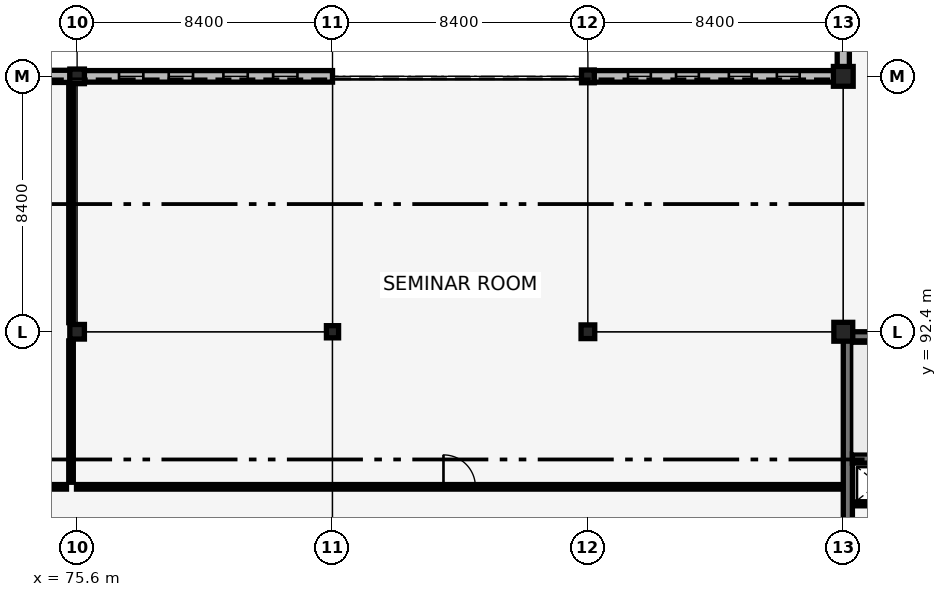
"""IFC4 building model, lengths in metres.
Left out: names, types, materials, properties, quantities, classifications, styles, units other than length and angle.
Written with IfcOpenShell. Run it as: python <this file> out.ifc"""

import sys

from ifc_helpers import new_model, si_unit, direction, frame, frame_2d, origin, origin_2d, place, context, subcontext, project, spatial, rectangle, extrude, element, fill, save


model = new_model("IFC4")
c1 = context("Model", 3, precision=1e-05, world=origin(), true_north=direction((0.0, 1.0)))
c2 = subcontext(c1, "Body", "Model", "MODEL_VIEW")
j1 = project(units=[si_unit("LENGTHUNIT", "METRE"), si_unit("PLANEANGLEUNIT", "RADIAN")], contexts=[c1])
p1 = place(None, origin())
s1 = spatial("IfcSite", under=j1, at=p1, CompositionType="ELEMENT")
p2 = place(p1, origin())
s2 = spatial("IfcBuilding", under=s1, at=p2, CompositionType="ELEMENT")
p3 = place(p2, frame((0.0, 0.0, 5.44)))
s3 = spatial("IfcBuildingStorey", under=s2, at=p3, CompositionType="ELEMENT", Elevation=5.44)
p4 = place(p3, frame((100.95, 92.25, 0.0), z_axis=(0.0, 0.0, 1.0), x_axis=(1.0, 0.0, 0.0)))
e1 = element("IfcWall", 1, at=p4, inside=s3, PredefinedType="SHEAR", context=c2, shape_type="SweptSolid", body=[
    extrude(rectangle(XDim=8.1, YDim=0.3, at=frame_2d((4.05, 0.0))), origin(), (0.0, 0.0, 1.0), 4.12),
])
p5 = place(p3, frame((100.95, 84.15, 0.0), z_axis=(0.0, 0.0, 1.0), x_axis=(0.0, 1.0, 0.0)))
e2 = element("IfcWall", 2, at=p5, inside=s3, PredefinedType="SHEAR", context=c2, shape_type="SweptSolid", body=[
    extrude(rectangle(XDim=8.1, YDim=0.3, at=frame_2d((4.05, 0.0))), origin(), (0.0, 0.0, 1.0), 4.12),
])
p6 = place(p5, frame((1.05, 0.0, 0.0)))
e3 = element("IfcOpeningElement", 3, at=p6, cuts=e2, PredefinedType="OPENING", context=c2, shape_type="SweptSolid", body=[
    extrude(rectangle(XDim=1.0, YDim=2.15, at=frame_2d((0.5, 1.075))), frame((0.0, 0.16, 0.0), z_axis=(0.0, -1.0, 0.0), x_axis=(1.0, 0.0, 0.0)), (0.0, 0.0, 1.0), 0.32),
])
p7 = place(p3, frame((101.1, 88.23, 0.0), z_axis=(0.0, 0.0, 1.0), x_axis=(1.0, 0.0, 0.0)))
e4 = element("IfcWall", 4, at=p7, inside=s3, PredefinedType="SHEAR", context=c2, shape_type="SweptSolid", body=[
    extrude(rectangle(XDim=7.8, YDim=0.3, at=frame_2d((3.9, 0.0))), origin(), (0.0, 0.0, 1.0), 4.12),
])
p8 = place(p7, frame((6.2, 0.0, 0.0)))
e5 = element("IfcOpeningElement", 5, at=p8, cuts=e4, PredefinedType="OPENING", context=c2, shape_type="SweptSolid", body=[
    extrude(rectangle(XDim=1.35, YDim=2.15, at=frame_2d((0.675, 1.075))), frame((0.0, 0.16, 0.0), z_axis=(0.0, -1.0, 0.0), x_axis=(1.0, 0.0, 0.0)), (0.0, 0.0, 1.0), 0.32),
])
for number, where, z_axis, x_axis in (
    (6, (75.6, 92.4, 0.0), (0.0, 0.0, 1.0), (1.0, 0.0, 0.0)),
    (7, (75.6, 100.8, 0.0), (0.0, 0.0, 1.0), (1.0, 0.0, 0.0)),
):
    element("IfcColumn", number, at=place(p3, frame(where, z_axis=z_axis, x_axis=x_axis)), inside=s3, PredefinedType="COLUMN", context=c2, shape_type="SweptSolid", body=[
        extrude(rectangle(XDim=0.48, YDim=0.48, at=origin_2d()), origin(), (0.0, 0.0, 1.0), 4.12),
    ])
p9 = place(p3, frame((84.0, 92.4, 0.0), z_axis=(0.0, 0.0, 1.0), x_axis=(1.0, 0.0, 0.0)))
e8 = element("IfcColumn", 8, at=p9, inside=s3, PredefinedType="COLUMN", context=c2, shape_type="SweptSolid", body=[
    extrude(rectangle(XDim=0.4, YDim=0.4, at=origin_2d()), origin(), (0.0, 0.0, 1.0), 4.12),
])
p10 = place(p3, frame((92.4, 92.4, 0.0), z_axis=(0.0, 0.0, 1.0), x_axis=(1.0, 0.0, 0.0)))
e9 = element("IfcColumn", 9, at=p10, inside=s3, PredefinedType="COLUMN", context=c2, shape_type="SweptSolid", body=[
    extrude(rectangle(XDim=0.45, YDim=0.45, at=origin_2d()), origin(), (0.0, 0.0, 1.0), 4.12),
])
p11 = place(p3, frame((92.4, 100.8, 0.0), z_axis=(0.0, 0.0, 1.0), x_axis=(1.0, 0.0, 0.0)))
e10 = element("IfcColumn", 10, at=p11, inside=s3, PredefinedType="COLUMN", context=c2, shape_type="SweptSolid", body=[
    extrude(rectangle(XDim=0.42, YDim=0.42, at=origin_2d()), origin(), (0.0, 0.0, 1.0), 4.12),
])
p12 = place(p3, frame((100.8, 92.4, 0.0), z_axis=(0.0, 0.0, 1.0), x_axis=(1.0, 0.0, 0.0)))
e11 = element("IfcColumn", 11, at=p12, inside=s3, PredefinedType="COLUMN", context=c2, shape_type="SweptSolid", body=[
    extrude(rectangle(XDim=0.62, YDim=0.62, at=origin_2d()), origin(), (0.0, 0.0, 1.0), 4.12),
])
p13 = place(p3, frame((100.8, 100.8, 0.0), z_axis=(0.0, 0.0, 1.0), x_axis=(1.0, 0.0, 0.0)))
e12 = element("IfcColumn", 12, at=p13, inside=s3, PredefinedType="COLUMN", context=c2, shape_type="SweptSolid", body=[
    extrude(rectangle(XDim=0.65, YDim=0.65, at=origin_2d()), origin(), (0.0, 0.0, 1.0), 4.12),
])
p14 = place(p3, frame((67.2, 100.8, 0.0), z_axis=(0.0, 0.0, 1.0), x_axis=(1.0, 0.0, 0.0)))
e13 = element("IfcWall", 13, at=p14, inside=s3, PredefinedType="SOLIDWALL", context=c2, shape_type="SweptSolid", body=[
    extrude(rectangle(XDim=8.175, YDim=0.4, at=frame_2d((4.087, 0.0))), origin(), (0.0, 0.0, 1.0), 3.52),
])
p15 = place(p14, frame((1.178, 0.0, 0.75)))
e14 = element("IfcOpeningElement", 14, at=p15, cuts=e13, PredefinedType="OPENING", context=c2, shape_type="SweptSolid", body=[
    extrude(rectangle(XDim=0.75, YDim=2.1, at=frame_2d((0.375, 1.05))), frame((0.0, 0.21, 0.0), z_axis=(0.0, -1.0, 0.0), x_axis=(1.0, 0.0, 0.0)), (0.0, 0.0, 1.0), 0.42),
])
p16 = place(p14, frame((2.813, 0.0, 0.75)))
e15 = element("IfcOpeningElement", 15, at=p16, cuts=e13, PredefinedType="OPENING", context=c2, shape_type="SweptSolid", body=[
    extrude(rectangle(XDim=0.75, YDim=2.1, at=frame_2d((0.375, 1.05))), frame((0.0, 0.21, 0.0), z_axis=(0.0, -1.0, 0.0), x_axis=(1.0, 0.0, 0.0)), (0.0, 0.0, 1.0), 0.42),
])
p17 = place(p14, frame((4.612, 0.0, 0.75)))
e16 = element("IfcOpeningElement", 16, at=p17, cuts=e13, PredefinedType="OPENING", context=c2, shape_type="SweptSolid", body=[
    extrude(rectangle(XDim=0.75, YDim=2.1, at=frame_2d((0.375, 1.05))), frame((0.0, 0.21, 0.0), z_axis=(0.0, -1.0, 0.0), x_axis=(1.0, 0.0, 0.0)), (0.0, 0.0, 1.0), 0.42),
])
p18 = place(p14, frame((6.247, 0.0, 0.75)))
e17 = element("IfcOpeningElement", 17, at=p18, cuts=e13, PredefinedType="OPENING", context=c2, shape_type="SweptSolid", body=[
    extrude(rectangle(XDim=0.75, YDim=2.1, at=frame_2d((0.375, 1.05))), frame((0.0, 0.21, 0.0), z_axis=(0.0, -1.0, 0.0), x_axis=(1.0, 0.0, 0.0)), (0.0, 0.0, 1.0), 0.42),
])
p19 = place(p3, frame((75.825, 100.8, 0.0), z_axis=(0.0, 0.0, 1.0), x_axis=(1.0, 0.0, 0.0)))
e18 = element("IfcWall", 18, at=p19, inside=s3, PredefinedType="SOLIDWALL", context=c2, shape_type="SweptSolid", body=[
    extrude(rectangle(XDim=8.175, YDim=0.38, at=frame_2d((4.087, 0.0))), origin(), (0.0, 0.0, 1.0), 3.52),
])
p20 = place(p19, frame((1.153, 0.0, 0.75)))
e19 = element("IfcOpeningElement", 19, at=p20, cuts=e18, PredefinedType="OPENING", context=c2, shape_type="SweptSolid", body=[
    extrude(rectangle(XDim=0.8, YDim=2.55, at=frame_2d((0.4, 1.275))), frame((0.0, 0.2, 0.0), z_axis=(0.0, -1.0, 0.0), x_axis=(1.0, 0.0, 0.0)), (0.0, 0.0, 1.0), 0.4),
])
p21 = place(p19, frame((2.788, 0.0, 0.75)))
e20 = element("IfcOpeningElement", 20, at=p21, cuts=e18, PredefinedType="OPENING", context=c2, shape_type="SweptSolid", body=[
    extrude(rectangle(XDim=0.8, YDim=2.55, at=frame_2d((0.4, 1.275))), frame((0.0, 0.2, 0.0), z_axis=(0.0, -1.0, 0.0), x_axis=(1.0, 0.0, 0.0)), (0.0, 0.0, 1.0), 0.4),
])
p22 = place(p19, frame((4.587, 0.0, 0.75)))
e21 = element("IfcOpeningElement", 21, at=p22, cuts=e18, PredefinedType="OPENING", context=c2, shape_type="SweptSolid", body=[
    extrude(rectangle(XDim=0.8, YDim=2.55, at=frame_2d((0.4, 1.275))), frame((0.0, 0.2, 0.0), z_axis=(0.0, -1.0, 0.0), x_axis=(1.0, 0.0, 0.0)), (0.0, 0.0, 1.0), 0.4),
])
p23 = place(p19, frame((6.222, 0.0, 0.75)))
e22 = element("IfcOpeningElement", 22, at=p23, cuts=e18, PredefinedType="OPENING", context=c2, shape_type="SweptSolid", body=[
    extrude(rectangle(XDim=0.8, YDim=2.55, at=frame_2d((0.4, 1.275))), frame((0.0, 0.2, 0.0), z_axis=(0.0, -1.0, 0.0), x_axis=(1.0, 0.0, 0.0)), (0.0, 0.0, 1.0), 0.4),
])
p24 = place(p3, frame((92.595, 100.8, 0.0), z_axis=(0.0, 0.0, 1.0), x_axis=(1.0, 0.0, 0.0)))
e23 = element("IfcWall", 23, at=p24, inside=s3, PredefinedType="SOLIDWALL", context=c2, shape_type="SweptSolid", body=[
    extrude(rectangle(XDim=7.895, YDim=0.38, at=frame_2d((3.948, 0.0))), origin(), (0.0, 0.0, 1.0), 3.34),
])
p25 = place(p24, frame((1.125, 0.0, 0.7)))
e24 = element("IfcOpeningElement", 24, at=p25, cuts=e23, PredefinedType="OPENING", context=c2, shape_type="SweptSolid", body=[
    extrude(rectangle(XDim=0.75, YDim=2.1, at=frame_2d((0.375, 1.05))), frame((0.0, 0.2, 0.0), z_axis=(0.0, -1.0, 0.0), x_axis=(1.0, 0.0, 0.0)), (0.0, 0.0, 1.0), 0.4),
])
p26 = place(p24, frame((2.704, 0.0, 0.7)))
e25 = element("IfcOpeningElement", 25, at=p26, cuts=e23, PredefinedType="OPENING", context=c2, shape_type="SweptSolid", body=[
    extrude(rectangle(XDim=0.75, YDim=2.1, at=frame_2d((0.375, 1.05))), frame((0.0, 0.2, 0.0), z_axis=(0.0, -1.0, 0.0), x_axis=(1.0, 0.0, 0.0)), (0.0, 0.0, 1.0), 0.4),
])
p27 = place(p24, frame((4.441, 0.0, 0.7)))
e26 = element("IfcOpeningElement", 26, at=p27, cuts=e23, PredefinedType="OPENING", context=c2, shape_type="SweptSolid", body=[
    extrude(rectangle(XDim=0.75, YDim=2.1, at=frame_2d((0.375, 1.05))), frame((0.0, 0.2, 0.0), z_axis=(0.0, -1.0, 0.0), x_axis=(1.0, 0.0, 0.0)), (0.0, 0.0, 1.0), 0.4),
])
p28 = place(p24, frame((6.02, 0.0, 0.7)))
e27 = element("IfcOpeningElement", 27, at=p28, cuts=e23, PredefinedType="OPENING", context=c2, shape_type="SweptSolid", body=[
    extrude(rectangle(XDim=0.75, YDim=2.1, at=frame_2d((0.375, 1.05))), frame((0.0, 0.2, 0.0), z_axis=(0.0, -1.0, 0.0), x_axis=(1.0, 0.0, 0.0)), (0.0, 0.0, 1.0), 0.4),
])
p29 = place(p3, frame((100.8, 101.11, 0.0), z_axis=(0.0, 0.0, 1.0), x_axis=(0.0, 1.0, 0.0)))
e28 = element("IfcWall", 28, at=p29, inside=s3, PredefinedType="SOLIDWALL", context=c2, shape_type="SweptSolid", body=[
    extrude(rectangle(XDim=7.795, YDim=0.4, at=frame_2d((3.897, 0.0))), origin(), (0.0, 0.0, 1.0), 3.47),
])
p30 = place(p29, frame((1.106, 0.0, 0.75)))
e29 = element("IfcOpeningElement", 29, at=p30, cuts=e28, PredefinedType="OPENING", context=c2, shape_type="SweptSolid", body=[
    extrude(rectangle(XDim=0.75, YDim=2.1, at=frame_2d((0.375, 1.05))), frame((0.0, 0.21, 0.0), z_axis=(0.0, -1.0, 0.0), x_axis=(1.0, 0.0, 0.0)), (0.0, 0.0, 1.0), 0.42),
])
p31 = place(p29, frame((2.665, 0.0, 0.75)))
e30 = element("IfcOpeningElement", 30, at=p31, cuts=e28, PredefinedType="OPENING", context=c2, shape_type="SweptSolid", body=[
    extrude(rectangle(XDim=0.75, YDim=2.1, at=frame_2d((0.375, 1.05))), frame((0.0, 0.21, 0.0), z_axis=(0.0, -1.0, 0.0), x_axis=(1.0, 0.0, 0.0)), (0.0, 0.0, 1.0), 0.42),
])
p32 = place(p29, frame((4.38, 0.0, 0.75)))
e31 = element("IfcOpeningElement", 31, at=p32, cuts=e28, PredefinedType="OPENING", context=c2, shape_type="SweptSolid", body=[
    extrude(rectangle(XDim=0.75, YDim=2.1, at=frame_2d((0.375, 1.05))), frame((0.0, 0.21, 0.0), z_axis=(0.0, -1.0, 0.0), x_axis=(1.0, 0.0, 0.0)), (0.0, 0.0, 1.0), 0.42),
])
p33 = place(p29, frame((5.939, 0.0, 0.75)))
e32 = element("IfcOpeningElement", 32, at=p33, cuts=e28, PredefinedType="OPENING", context=c2, shape_type="SweptSolid", body=[
    extrude(rectangle(XDim=0.75, YDim=2.1, at=frame_2d((0.375, 1.05))), frame((0.0, 0.21, 0.0), z_axis=(0.0, -1.0, 0.0), x_axis=(1.0, 0.0, 0.0)), (0.0, 0.0, 1.0), 0.42),
])
p34 = place(p3, frame((101.12, 86.74, 0.0), z_axis=(0.0, 0.0, 1.0), x_axis=(1.0, 0.0, 0.0)))
e33 = element("IfcWall", 33, at=p34, inside=s3, PredefinedType="PARTITIONING", context=c2, shape_type="SweptSolid", body=[
    extrude(rectangle(XDim=1.62, YDim=0.13, at=frame_2d((0.81, 0.0))), origin(), (0.0, 0.0, 1.0), 4.12),
])
p35 = place(p3, frame((50.43, 87.3, 0.0), z_axis=(0.0, 0.0, 1.0), x_axis=(1.0, 0.0, 0.0)))
e34 = element("IfcWall", 34, at=p35, inside=s3, PredefinedType="PARTITIONING", context=c2, shape_type="SweptSolid", body=[
    extrude(rectangle(XDim=24.82, YDim=0.15, at=frame_2d((12.41, 0.0))), origin(), (0.0, 0.0, 1.0), 3.47),
])
p36 = place(p35, frame((11.885, 0.0, 0.0)))
e35 = element("IfcOpeningElement", 35, at=p36, cuts=e34, PredefinedType="OPENING", context=c2, shape_type="SweptSolid", body=[
    extrude(rectangle(XDim=1.05, YDim=2.15, at=frame_2d((0.525, 1.075))), frame((0.0, 0.085, 0.0), z_axis=(0.0, -1.0, 0.0), x_axis=(1.0, 0.0, 0.0)), (0.0, 0.0, 1.0), 0.17),
])
p37 = place(p3, frame((75.4, 87.45, 0.0), z_axis=(0.0, 0.0, 1.0), x_axis=(0.0, 1.0, 0.0)))
e36 = element("IfcWall", 36, at=p37, inside=s3, PredefinedType="PARTITIONING", context=c2, shape_type="SweptSolid", body=[
    extrude(rectangle(XDim=4.65, YDim=0.15, at=frame_2d((2.325, 0.0))), origin(), (0.0, 0.0, 1.0), 3.44),
])
p38 = place(p3, frame((75.4, 92.7, 0.0), z_axis=(0.0, 0.0, 1.0), x_axis=(0.0, 1.0, 0.0)))
e37 = element("IfcWall", 37, at=p38, inside=s3, PredefinedType="PARTITIONING", context=c2, shape_type="SweptSolid", body=[
    extrude(rectangle(XDim=7.75, YDim=0.15, at=frame_2d((3.875, 0.0))), origin(), (0.0, 0.0, 1.0), 3.44),
])
p39 = place(p3, frame((75.58, 87.3, 0.0), z_axis=(0.0, 0.0, 1.0), x_axis=(1.0, 0.0, 0.0)))
e38 = element("IfcWall", 38, at=p39, inside=s3, PredefinedType="PARTITIONING", context=c2, shape_type="SweptSolid", body=[
    extrude(rectangle(XDim=25.19, YDim=0.15, at=frame_2d((12.595, 0.0))), origin(), (0.0, 0.0, 1.0), 3.47),
])
p40 = place(p39, frame((12.07, 0.0, 0.0)))
e39 = element("IfcOpeningElement", 39, at=p40, cuts=e38, PredefinedType="OPENING", context=c2, shape_type="SweptSolid", body=[
    extrude(rectangle(XDim=1.05, YDim=2.15, at=frame_2d((0.525, 1.075))), frame((0.0, 0.085, 0.0), z_axis=(0.0, -1.0, 0.0), x_axis=(1.0, 0.0, 0.0)), (0.0, 0.0, 1.0), 0.17),
])
p41 = place(p20, origin())
e40 = element("IfcWindow", 40, at=p41, inside=s3, PartitioningType="DOUBLE_PANEL_VERTICAL", PredefinedType="WINDOW", context=c2, shape_type="SweptSolid", body=[
    extrude(rectangle(XDim=0.8, YDim=2.55, at=frame_2d((0.4, 1.275))), frame((0.0, 0.03, 0.0), z_axis=(0.0, -1.0, 0.0), x_axis=(1.0, 0.0, 0.0)), (0.0, 0.0, 1.0), 0.06),
])
fill(e19, e40)
p42 = place(p21, origin())
e41 = element("IfcWindow", 41, at=p42, inside=s3, PartitioningType="DOUBLE_PANEL_VERTICAL", PredefinedType="WINDOW", context=c2, shape_type="SweptSolid", body=[
    extrude(rectangle(XDim=0.8, YDim=2.55, at=frame_2d((0.4, 1.275))), frame((0.0, 0.03, 0.0), z_axis=(0.0, -1.0, 0.0), x_axis=(1.0, 0.0, 0.0)), (0.0, 0.0, 1.0), 0.06),
])
fill(e20, e41)
p43 = place(p22, origin())
e42 = element("IfcWindow", 42, at=p43, inside=s3, PartitioningType="DOUBLE_PANEL_VERTICAL", PredefinedType="WINDOW", context=c2, shape_type="SweptSolid", body=[
    extrude(rectangle(XDim=0.8, YDim=2.55, at=frame_2d((0.4, 1.275))), frame((0.0, 0.03, 0.0), z_axis=(0.0, -1.0, 0.0), x_axis=(1.0, 0.0, 0.0)), (0.0, 0.0, 1.0), 0.06),
])
fill(e21, e42)
p44 = place(p23, origin())
e43 = element("IfcWindow", 43, at=p44, inside=s3, PartitioningType="DOUBLE_PANEL_VERTICAL", PredefinedType="WINDOW", context=c2, shape_type="SweptSolid", body=[
    extrude(rectangle(XDim=0.8, YDim=2.55, at=frame_2d((0.4, 1.275))), frame((0.0, 0.03, 0.0), z_axis=(0.0, -1.0, 0.0), x_axis=(1.0, 0.0, 0.0)), (0.0, 0.0, 1.0), 0.06),
])
fill(e22, e43)
p45 = place(p25, origin())
e44 = element("IfcWindow", 44, at=p45, inside=s3, PartitioningType="DOUBLE_PANEL_VERTICAL", PredefinedType="WINDOW", context=c2, shape_type="SweptSolid", body=[
    extrude(rectangle(XDim=0.75, YDim=2.1, at=frame_2d((0.375, 1.05))), frame((0.0, 0.03, 0.0), z_axis=(0.0, -1.0, 0.0), x_axis=(1.0, 0.0, 0.0)), (0.0, 0.0, 1.0), 0.06),
])
fill(e24, e44)
p46 = place(p26, origin())
e45 = element("IfcWindow", 45, at=p46, inside=s3, PartitioningType="DOUBLE_PANEL_VERTICAL", PredefinedType="WINDOW", context=c2, shape_type="SweptSolid", body=[
    extrude(rectangle(XDim=0.75, YDim=2.1, at=frame_2d((0.375, 1.05))), frame((0.0, 0.03, 0.0), z_axis=(0.0, -1.0, 0.0), x_axis=(1.0, 0.0, 0.0)), (0.0, 0.0, 1.0), 0.06),
])
fill(e25, e45)
p47 = place(p27, origin())
e46 = element("IfcWindow", 46, at=p47, inside=s3, PartitioningType="DOUBLE_PANEL_VERTICAL", PredefinedType="WINDOW", context=c2, shape_type="SweptSolid", body=[
    extrude(rectangle(XDim=0.75, YDim=2.1, at=frame_2d((0.375, 1.05))), frame((0.0, 0.03, 0.0), z_axis=(0.0, -1.0, 0.0), x_axis=(1.0, 0.0, 0.0)), (0.0, 0.0, 1.0), 0.06),
])
fill(e26, e46)
p48 = place(p28, origin())
e47 = element("IfcWindow", 47, at=p48, inside=s3, PartitioningType="DOUBLE_PANEL_VERTICAL", PredefinedType="WINDOW", context=c2, shape_type="SweptSolid", body=[
    extrude(rectangle(XDim=0.75, YDim=2.1, at=frame_2d((0.375, 1.05))), frame((0.0, 0.03, 0.0), z_axis=(0.0, -1.0, 0.0), x_axis=(1.0, 0.0, 0.0)), (0.0, 0.0, 1.0), 0.06),
])
fill(e27, e47)
p49 = place(p40, origin())
e48 = element("IfcDoor", 48, at=p49, inside=s3, OperationType="SINGLE_SWING_LEFT", PredefinedType="DOOR", context=c2, shape_type="SweptSolid", body=[
    extrude(rectangle(XDim=1.05, YDim=2.15, at=frame_2d((0.525, 1.075))), frame((0.0, 0.025, 0.0), z_axis=(0.0, -1.0, 0.0), x_axis=(1.0, 0.0, 0.0)), (0.0, 0.0, 1.0), 0.05),
])
fill(e39, e48)
save(model, sys.argv[1])
